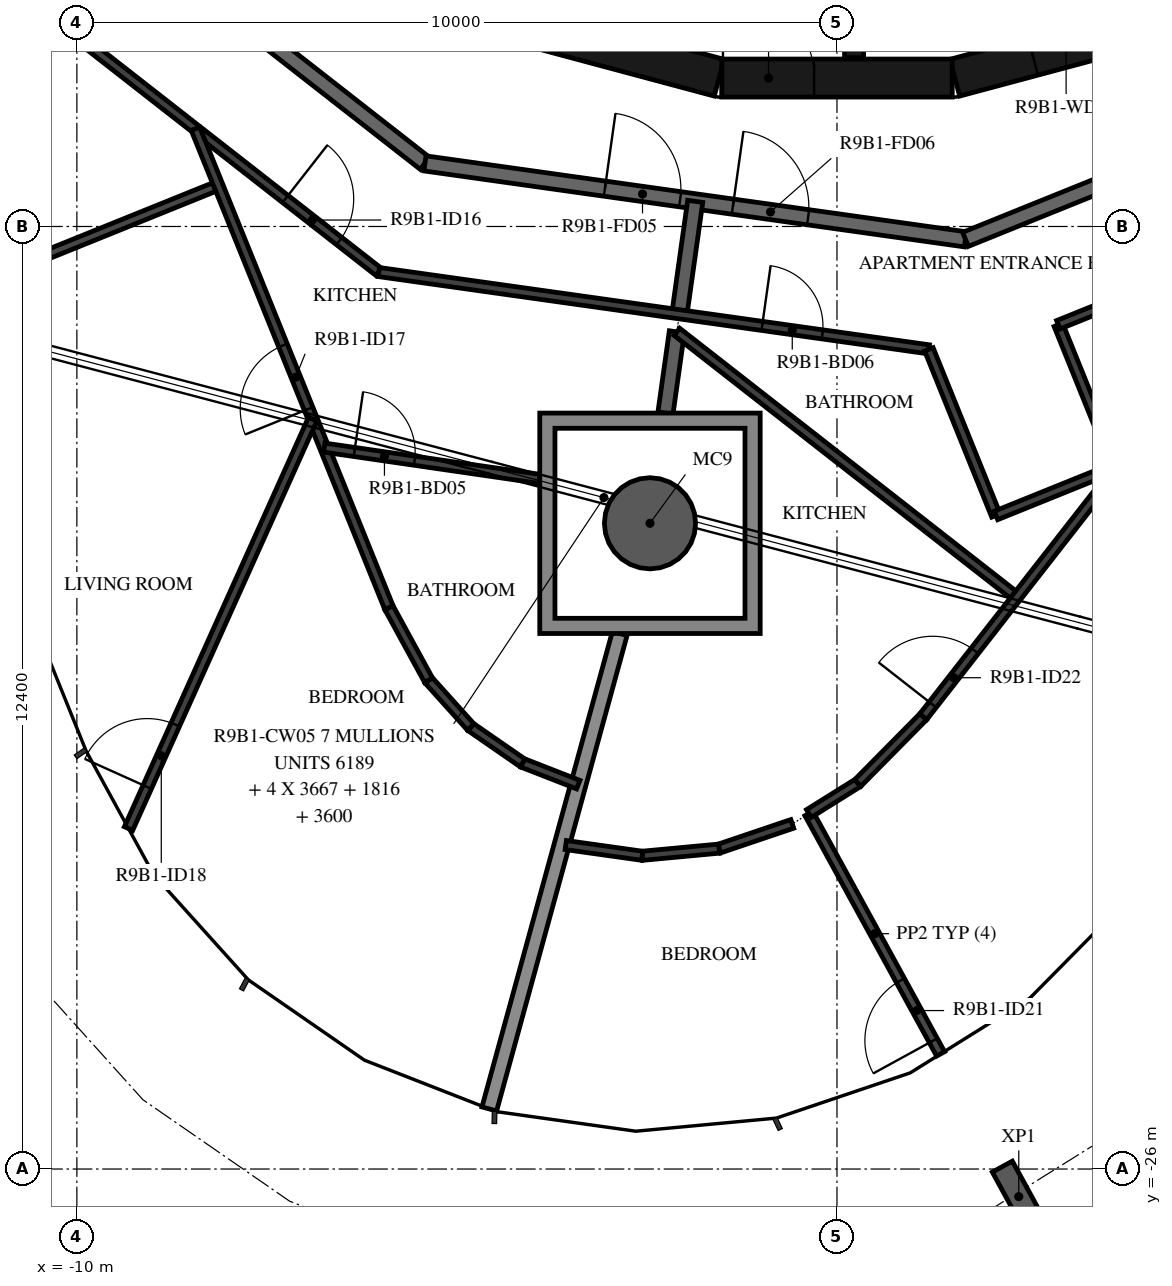
"""IFC4 building model, lengths in metres.
Left out: names, types, materials, properties, quantities, classifications, styles, units other than length and angle.
Written with IfcOpenShell. Run it as: python <this file> out.ifc"""

import sys

from ifc_helpers import new_model, si_unit, direction, frame, frame_2d, origin, origin_2d, place, context, subcontext, project, spatial, polyline, rectangle, hollow_circle, i_section, outline, extrude, element, fill, save


model = new_model("IFC4")
c1 = context("Model", 3, precision=1e-05, world=origin(), true_north=direction((0.0, 1.0)))
c2 = subcontext(c1, "Body", "Model", "MODEL_VIEW")
j1 = project(units=[si_unit("LENGTHUNIT", "METRE"), si_unit("PLANEANGLEUNIT", "RADIAN")], contexts=[c1])
p1 = place(None, origin())
s1 = spatial("IfcSite", under=j1, at=p1, CompositionType="ELEMENT")
p2 = place(p1, origin())
s2 = spatial("IfcBuilding", under=s1, at=p2, CompositionType="ELEMENT")
p3 = place(p2, frame((0.0, 0.0, 350.5)))
s3 = spatial("IfcBuildingStorey", under=s2, at=p3, CompositionType="ELEMENT", Elevation=350.5)
p4 = place(p3, frame((-2.46, -17.505, -0.38), z_axis=(0.0, 0.0, 1.0), x_axis=(1.0, 0.0, 0.0)))
e1 = element("IfcColumn", 1, at=p4, inside=s3, PredefinedType="COLUMN", context=c2, shape_type="SweptSolid", body=[
    extrude(hollow_circle(Radius=0.6, WallThickness=0.03, at=origin_2d()), origin(), (0.0, 0.0, 1.0), 3.5),
])
p5 = place(p3, frame((2.392, -26.363, -0.38), z_axis=(0.0, 0.0, 1.0), x_axis=(-0.877055410309, -0.480389224741, 0.0)))
e2 = element("IfcColumn", 2, at=p5, inside=s3, PredefinedType="COLUMN", context=c2, shape_type="SweptSolid", body=[
    extrude(i_section(OverallWidth=0.3, OverallDepth=0.9, WebThickness=0.019, FlangeThickness=0.035, FilletRadius=0.03, at=origin_2d()), origin(), (0.0, 0.0, 1.0), 3.5),
])
p6 = place(p3, frame((1.55, -11.643, 0.0), z_axis=(0.0, 0.0, 1.0), x_axis=(0.965948410781, 0.258734743916, 0.0)))
e3 = element("IfcWall", 3, at=p6, inside=s3, PredefinedType="SHEAR", context=c2, shape_type="SweptSolid", body=[
    extrude(rectangle(XDim=3.033, YDim=0.5, at=frame_2d((1.516, 0.0))), origin(), (0.0, 0.0, 1.0), 3.12),
])
p7 = place(p6, frame((1.066, 0.0, 0.0)))
e4 = element("IfcOpeningElement", 4, at=p7, cuts=e3, PredefinedType="OPENING", context=c2, shape_type="SweptSolid", body=[
    extrude(rectangle(XDim=0.9, YDim=2.1, at=frame_2d((0.45, 1.05))), frame((0.0, 0.26, 0.0), z_axis=(0.0, -1.0, 0.0), x_axis=(1.0, 0.0, 0.0)), (0.0, 0.0, 1.0), 0.52),
])
p8 = place(p3, frame((-4.479, -10.858, 0.0), z_axis=(0.0, 0.0, 1.0), x_axis=(0.965948410781, -0.258734743916, 0.0)))
e5 = element("IfcWall", 5, at=p8, inside=s3, PredefinedType="SHEAR", context=c2, shape_type="SweptSolid", body=[
    extrude(rectangle(XDim=3.033, YDim=0.5, at=frame_2d((1.516, 0.0))), origin(), (0.0, 0.0, 1.0), 3.12),
])
p9 = place(p3, frame((-1.516, -11.647, 0.0), z_axis=(0.0, 0.0, 1.0), x_axis=(1.0, 0.0, 0.0)))
e6 = element("IfcWall", 6, at=p9, inside=s3, PredefinedType="SHEAR", context=c2, shape_type="SweptSolid", body=[
    extrude(rectangle(XDim=3.033, YDim=0.5, at=frame_2d((1.516, 0.0))), origin(), (0.0, 0.0, 1.0), 3.12),
])
p10 = place(p9, frame((0.016, 0.0, 0.0)))
e7 = element("IfcOpeningElement", 7, at=p10, cuts=e6, PredefinedType="OPENING", context=c2, shape_type="SweptSolid", body=[
    extrude(rectangle(XDim=1.2, YDim=2.1, at=frame_2d((0.6, 1.05))), frame((0.0, 0.26, 0.0), z_axis=(0.0, -1.0, 0.0), x_axis=(1.0, 0.0, 0.0)), (0.0, 0.0, 1.0), 0.52),
])
p11 = place(p3, frame((0.225, -8.97, 0.0), z_axis=(0.0, 0.0, 1.0), x_axis=(0.0, -1.0, 0.0)))
e8 = element("IfcWall", 8, at=p11, inside=s3, PredefinedType="SHEAR", context=c2, shape_type="SweptSolid", body=[
    extrude(rectangle(XDim=2.41, YDim=0.25, at=frame_2d((1.205, 0.0))), origin(), (0.0, 0.0, 1.0), 3.12),
])
p12 = place(p3, frame((-11.079, -8.349, 0.0), z_axis=(0.0, 0.0, 1.0), x_axis=(0.78800478687, -0.615669112324, 0.0)))
e9 = element("IfcWall", 9, at=p12, inside=s3, PredefinedType="STANDARD", context=c2, shape_type="SweptSolid", body=[
    extrude(rectangle(XDim=7.181, YDim=0.2, at=frame_2d((3.591, 0.0))), origin(), (0.0, 0.0, 1.0), 3.12),
])
p13 = place(p3, frame((-5.42, -12.77, 0.0), z_axis=(0.0, 0.0, 1.0), x_axis=(0.990270565508, -0.139155334385, 0.0)))
e10 = element("IfcWall", 10, at=p13, inside=s3, PredefinedType="STANDARD", context=c2, shape_type="SweptSolid", body=[
    extrude(rectangle(XDim=7.181, YDim=0.2, at=frame_2d((3.59, 0.0))), origin(), (0.0, 0.0, 1.0), 3.12),
])
p14 = place(p13, frame((2.39, 0.0, 0.0)))
e11 = element("IfcOpeningElement", 11, at=p14, cuts=e10, PredefinedType="OPENING", context=c2, shape_type="SweptSolid", body=[
    extrude(rectangle(XDim=1.0, YDim=2.1, at=frame_2d((0.5, 1.05))), frame((0.0, 0.11, 0.0), z_axis=(0.0, -1.0, 0.0), x_axis=(1.0, 0.0, 0.0)), (0.0, 0.0, 1.0), 0.22),
])
p15 = place(p13, frame((4.091, 0.0, 0.0)))
e12 = element("IfcOpeningElement", 12, at=p15, cuts=e10, PredefinedType="OPENING", context=c2, shape_type="SweptSolid", body=[
    extrude(rectangle(XDim=1.0, YDim=2.1, at=frame_2d((0.5, 1.05))), frame((0.0, 0.11, 0.0), z_axis=(0.0, -1.0, 0.0), x_axis=(1.0, 0.0, 0.0)), (0.0, 0.0, 1.0), 0.22),
])
p16 = place(p3, frame((1.691, -13.769, 0.0), z_axis=(0.0, 0.0, 1.0), x_axis=(0.92717916932, 0.374618189599, 0.0)))
e13 = element("IfcWall", 13, at=p16, inside=s3, PredefinedType="STANDARD", context=c2, shape_type="SweptSolid", body=[
    extrude(rectangle(XDim=7.181, YDim=0.2, at=frame_2d((3.591, 0.0))), origin(), (0.0, 0.0, 1.0), 3.12),
])
p17 = place(p3, frame((-2.073, -14.755, 0.0), z_axis=(0.0, 0.0, 1.0), x_axis=(0.139005431033, 0.990291618738, 0.0)))
e14 = element("IfcWall", 14, at=p17, inside=s3, PredefinedType="STANDARD", context=c2, shape_type="SweptSolid", body=[
    extrude(rectangle(XDim=1.5, YDim=0.2, at=frame_2d((0.75, 0.0))), origin(), (0.0, 0.0, 1.0), 3.12),
])
p18 = place(p3, frame((-2.256, -16.055, 0.0), z_axis=(0.0, 0.0, 1.0), x_axis=(0.139109268657, 0.990277037689, 0.0)))
e15 = element("IfcWall", 15, at=p18, inside=s3, PredefinedType="STANDARD", context=c2, shape_type="SweptSolid", body=[
    extrude(rectangle(XDim=1.079, YDim=0.2, at=frame_2d((0.54, 0.0))), origin(), (0.0, 0.0, 1.0), 3.12),
])
p19 = place(p3, frame((-4.574, -25.21, 0.0), z_axis=(0.0, 0.0, 1.0), x_axis=(0.264579024648, 0.964364007892, 0.0)))
e16 = element("IfcWall", 16, at=p19, inside=s3, PredefinedType="STANDARD", context=c2, shape_type="SweptSolid", body=[
    extrude(rectangle(XDim=6.486, YDim=0.2, at=frame_2d((3.243, 0.0))), origin(), (0.0, 0.0, 1.0), 2.73),
])
p20 = place(p3, frame((-12.319, -9.283, 0.0), z_axis=(0.0, 0.0, 1.0), x_axis=(0.788000268464, -0.61567489546, 0.0)))
e17 = element("IfcWall", 17, at=p20, inside=s3, PredefinedType="PARTITIONING", context=c2, shape_type="SweptSolid", body=[
    extrude(rectangle(XDim=7.985, YDim=0.12, at=frame_2d((3.992, 0.0))), origin(), (0.0, 0.0, 1.0), 3.12),
])
p21 = place(p20, frame((6.423, 0.0, 0.0)))
e18 = element("IfcOpeningElement", 18, at=p21, cuts=e17, PredefinedType="OPENING", context=c2, shape_type="SweptSolid", body=[
    extrude(rectangle(XDim=0.9, YDim=2.1, at=frame_2d((0.45, 1.05))), frame((0.0, 0.07, 0.0), z_axis=(0.0, -1.0, 0.0), x_axis=(1.0, 0.0, 0.0)), (0.0, 0.0, 1.0), 0.14),
])
p22 = place(p3, frame((-6.027, -14.199, 0.0), z_axis=(0.0, 0.0, 1.0), x_axis=(0.990271617837, -0.139147845494, 0.0)))
e19 = element("IfcWall", 19, at=p22, inside=s3, PredefinedType="PARTITIONING", context=c2, shape_type="SweptSolid", body=[
    extrude(rectangle(XDim=7.308, YDim=0.12, at=frame_2d((3.654, 0.0))), origin(), (0.0, 0.0, 1.0), 3.12),
])
p23 = place(p22, frame((5.093, 0.0, 0.0)))
e20 = element("IfcOpeningElement", 20, at=p23, cuts=e19, PredefinedType="OPENING", context=c2, shape_type="SweptSolid", body=[
    extrude(rectangle(XDim=0.8, YDim=2.1, at=frame_2d((0.4, 1.05))), frame((0.0, 0.07, 0.0), z_axis=(0.0, -1.0, 0.0), x_axis=(1.0, 0.0, 0.0)), (0.0, 0.0, 1.0), 0.14),
])
p24 = place(p3, frame((-12.219, -14.708, 0.0), z_axis=(0.0, 0.0, 1.0), x_axis=(0.927189216671, 0.374593321469, 0.0)))
e21 = element("IfcWall", 21, at=p24, inside=s3, PredefinedType="PARTITIONING", context=c2, shape_type="SweptSolid", body=[
    extrude(rectangle(XDim=4.4, YDim=0.12, at=frame_2d((2.2, 0.0))), origin(), (0.0, 0.0, 1.0), 2.73),
])
p25 = place(p3, frame((-5.894, -18.616, 0.0), z_axis=(0.0, 0.0, 1.0), x_axis=(-0.374596683143, 0.927187858515, 0.0)))
e22 = element("IfcWall", 22, at=p25, inside=s3, PredefinedType="PARTITIONING", context=c2, shape_type="SweptSolid", body=[
    extrude(rectangle(XDim=6.796, YDim=0.12, at=frame_2d((3.398, 0.0))), origin(), (0.0, 0.0, 1.0), 3.12),
])
p26 = place(p25, frame((2.822, 0.0, 0.0)))
e23 = element("IfcOpeningElement", 23, at=p26, cuts=e22, PredefinedType="OPENING", context=c2, shape_type="SweptSolid", body=[
    extrude(rectangle(XDim=0.9, YDim=2.1, at=frame_2d((0.45, 1.05))), frame((0.0, 0.07, 0.0), z_axis=(0.0, -1.0, 0.0), x_axis=(1.0, 0.0, 0.0)), (0.0, 0.0, 1.0), 0.14),
])
p27 = place(p3, frame((-9.32, -21.521, 0.0), z_axis=(0.0, 0.0, 1.0), x_axis=(0.410206582363, 0.911992631432, 0.0)))
e24 = element("IfcWall", 24, at=p27, inside=s3, PredefinedType="PARTITIONING", context=c2, shape_type="SweptSolid", body=[
    extrude(rectangle(XDim=5.908, YDim=0.12, at=frame_2d((2.954, 0.0))), origin(), (0.0, 0.0, 1.0), 3.12),
])
p28 = place(p27, frame((0.6, 0.0, 0.0)))
e25 = element("IfcOpeningElement", 25, at=p28, cuts=e24, PredefinedType="OPENING", context=c2, shape_type="SweptSolid", body=[
    extrude(rectangle(XDim=0.9, YDim=2.1, at=frame_2d((0.45, 1.05))), frame((0.0, 0.07, 0.0), z_axis=(0.0, -1.0, 0.0), x_axis=(1.0, 0.0, 0.0)), (0.0, 0.0, 1.0), 0.14),
])
p29 = place(p3, frame((-6.745, -16.509, 0.0), z_axis=(0.0, 0.0, 1.0), x_axis=(0.989610924185, -0.143771411393, 0.0)))
e26 = element("IfcWall", 26, at=p29, inside=s3, PredefinedType="PARTITIONING", context=c2, shape_type="SweptSolid", body=[
    extrude(rectangle(XDim=2.865, YDim=0.12, at=frame_2d((1.432, 0.0))), origin(), (0.0, 0.0, 1.0), 3.12),
])
p30 = place(p29, frame((0.4, 0.0, 0.0)))
e27 = element("IfcOpeningElement", 27, at=p30, cuts=e26, PredefinedType="OPENING", context=c2, shape_type="SweptSolid", body=[
    extrude(rectangle(XDim=0.8, YDim=2.1, at=frame_2d((0.4, 1.05))), frame((0.0, 0.07, 0.0), z_axis=(0.0, -1.0, 0.0), x_axis=(1.0, 0.0, 0.0)), (0.0, 0.0, 1.0), 0.14),
])
p31 = place(p3, frame((-3.404, -20.943, 0.0), z_axis=(0.0, 0.0, 1.0), x_axis=(-0.931485289212, 0.363778993321, 0.0)))
e28 = element("IfcWall", 28, at=p31, inside=s3, PredefinedType="PARTITIONING", context=c2, shape_type="SweptSolid", body=[
    extrude(rectangle(XDim=0.787, YDim=0.12, at=frame_2d((0.393, 0.0))), origin(), (0.0, 0.0, 1.0), 3.12),
])
p32 = place(p3, frame((-4.136, -20.657, 0.0), z_axis=(0.0, 0.0, 1.0), x_axis=(-0.822552500908, 0.568689179826, 0.0)))
e29 = element("IfcWall", 29, at=p32, inside=s3, PredefinedType="PARTITIONING", context=c2, shape_type="SweptSolid", body=[
    extrude(rectangle(XDim=0.829, YDim=0.12, at=frame_2d((0.415, 0.0))), origin(), (0.0, 0.0, 1.0), 3.12),
])
p33 = place(p3, frame((-4.818, -20.186, 0.0), z_axis=(0.0, 0.0, 1.0), x_axis=(-0.669013557227, 0.743250200301, 0.0)))
e30 = element("IfcWall", 30, at=p33, inside=s3, PredefinedType="PARTITIONING", context=c2, shape_type="SweptSolid", body=[
    extrude(rectangle(XDim=0.829, YDim=0.12, at=frame_2d((0.415, 0.0))), origin(), (0.0, 0.0, 1.0), 3.12),
])
p34 = place(p3, frame((-5.373, -19.57, 0.0), z_axis=(0.0, 0.0, 1.0), x_axis=(-0.479796131471, 0.87738000446, 0.0)))
e31 = element("IfcWall", 31, at=p34, inside=s3, PredefinedType="PARTITIONING", context=c2, shape_type="SweptSolid", body=[
    extrude(rectangle(XDim=1.087, YDim=0.12, at=frame_2d((0.543, 0.0))), origin(), (0.0, 0.0, 1.0), 3.12),
])
p35 = place(p3, frame((1.209, -15.216, 0.0), z_axis=(0.0, 0.0, 1.0), x_axis=(0.374531550488, -0.927214170345, 0.0)))
e32 = element("IfcWall", 32, at=p35, inside=s3, PredefinedType="PARTITIONING", context=c2, shape_type="SweptSolid", body=[
    extrude(rectangle(XDim=2.357, YDim=0.12, at=frame_2d((1.179, 0.0))), origin(), (0.0, 0.0, 1.0), 3.12),
])
p36 = place(p3, frame((2.092, -17.402, 0.0), z_axis=(0.0, 0.0, 1.0), x_axis=(0.927153589835, 0.374681492546, 0.0)))
e33 = element("IfcWall", 33, at=p36, inside=s3, PredefinedType="PARTITIONING", context=c2, shape_type="SweptSolid", body=[
    extrude(rectangle(XDim=1.7, YDim=0.12, at=frame_2d((0.85, 0.0))), origin(), (0.0, 0.0, 1.0), 3.12),
])
p37 = place(p3, frame((3.668, -16.765, 0.0), z_axis=(0.0, 0.0, 1.0), x_axis=(-0.374621045498, 0.927178015416, 0.0)))
e34 = element("IfcWall", 34, at=p37, inside=s3, PredefinedType="PARTITIONING", context=c2, shape_type="SweptSolid", body=[
    extrude(rectangle(XDim=2.018, YDim=0.12, at=frame_2d((1.009, 0.0))), origin(), (0.0, 0.0, 1.0), 3.12),
])
p38 = place(p3, frame((2.912, -14.894, 0.0), z_axis=(0.0, 0.0, 1.0), x_axis=(0.927182280165, 0.374610490174, 0.0)))
e35 = element("IfcWall", 35, at=p38, inside=s3, PredefinedType="PARTITIONING", context=c2, shape_type="SweptSolid", body=[
    extrude(rectangle(XDim=6.872, YDim=0.12, at=frame_2d((3.436, 0.0))), origin(), (0.0, 0.0, 1.0), 3.12),
])
p39 = place(p38, frame((3.748, 0.0, 0.0)))
e36 = element("IfcOpeningElement", 36, at=p39, cuts=e35, PredefinedType="OPENING", context=c2, shape_type="SweptSolid", body=[
    extrude(rectangle(XDim=0.9, YDim=2.1, at=frame_2d((0.45, 1.05))), frame((0.0, 0.07, 0.0), z_axis=(0.0, -1.0, 0.0), x_axis=(1.0, 0.0, 0.0)), (0.0, 0.0, 1.0), 0.14),
])
p40 = place(p3, frame((-0.588, -21.459, 0.0), z_axis=(0.0, 0.0, 1.0), x_axis=(-0.94737753159, -0.320118435332, 0.0)))
e37 = element("IfcWall", 37, at=p40, inside=s3, PredefinedType="PARTITIONING", context=c2, shape_type="SweptSolid", body=[
    extrude(rectangle(XDim=1.016, YDim=0.12, at=frame_2d((0.508, 0.0))), origin(), (0.0, 0.0, 1.0), 3.12),
])
p41 = place(p3, frame((-1.55, -21.785, 0.0), z_axis=(0.0, 0.0, 1.0), x_axis=(-0.995667655176, -0.092983441736, 0.0)))
e38 = element("IfcWall", 38, at=p41, inside=s3, PredefinedType="PARTITIONING", context=c2, shape_type="SweptSolid", body=[
    extrude(rectangle(XDim=1.016, YDim=0.12, at=frame_2d((0.508, 0.0))), origin(), (0.0, 0.0, 1.0), 3.12),
])
p42 = place(p3, frame((-2.562, -21.879, 0.0), z_axis=(0.0, 0.0, 1.0), x_axis=(-0.990273657549, 0.139133328736, 0.0)))
e39 = element("IfcWall", 39, at=p42, inside=s3, PredefinedType="PARTITIONING", context=c2, shape_type="SweptSolid", body=[
    extrude(rectangle(XDim=1.016, YDim=0.12, at=frame_2d((0.508, 0.0))), origin(), (0.0, 0.0, 1.0), 3.12),
])
p43 = place(p3, frame((1.363, -24.485, 0.0), z_axis=(0.0, 0.0, 1.0), x_axis=(-0.480374148719, 0.877063667725, 0.0)))
e40 = element("IfcWall", 40, at=p43, inside=s3, PredefinedType="PARTITIONING", context=c2, shape_type="SweptSolid", body=[
    extrude(rectangle(XDim=3.606, YDim=0.12, at=frame_2d((1.803, 0.0))), origin(), (0.0, 0.0, 1.0), 2.73),
])
p44 = place(p43, frame((0.2, 0.0, 0.0)))
e41 = element("IfcOpeningElement", 41, at=p44, cuts=e40, PredefinedType="OPENING", context=c2, shape_type="SweptSolid", body=[
    extrude(rectangle(XDim=0.9, YDim=2.1, at=frame_2d((0.45, 1.05))), frame((0.0, 0.07, 0.0), z_axis=(0.0, -1.0, 0.0), x_axis=(1.0, 0.0, 0.0)), (0.0, 0.0, 1.0), 0.14),
])
p45 = place(p3, frame((2.363, -18.478, 0.0), z_axis=(0.0, 0.0, 1.0), x_axis=(-0.788010669333, 0.615661583191, 0.0)))
e42 = element("IfcWall", 42, at=p45, inside=s3, PredefinedType="PARTITIONING", context=c2, shape_type="SweptSolid", body=[
    extrude(rectangle(XDim=5.672, YDim=0.12, at=frame_2d((2.836, 0.0))), origin(), (0.0, 0.0, 1.0), 3.12),
])
p46 = place(p3, frame((-0.369, -21.323, 0.0), z_axis=(0.0, 0.0, 1.0), x_axis=(0.847998304005, 0.529998940003, 0.0)))
e43 = element("IfcWall", 43, at=p46, inside=s3, PredefinedType="PARTITIONING", context=c2, shape_type="SweptSolid", body=[
    extrude(rectangle(XDim=0.758, YDim=0.12, at=frame_2d((0.379, 0.0))), origin(), (0.0, 0.0, 1.0), 3.12),
])
p47 = place(p3, frame((0.274, -20.921, 0.0), z_axis=(0.0, 0.0, 1.0), x_axis=(0.702915150142, 0.711273710818, 0.0)))
e44 = element("IfcWall", 44, at=p47, inside=s3, PredefinedType="PARTITIONING", context=c2, shape_type="SweptSolid", body=[
    extrude(rectangle(XDim=1.227, YDim=0.12, at=frame_2d((0.613, 0.0))), origin(), (0.0, 0.0, 1.0), 3.12),
])
p48 = place(p3, frame((1.136, -20.049, 0.0), z_axis=(0.0, 0.0, 1.0), x_axis=(0.615662465763, 0.788009979792, 0.0)))
e45 = element("IfcWall", 45, at=p48, inside=s3, PredefinedType="PARTITIONING", context=c2, shape_type="SweptSolid", body=[
    extrude(rectangle(XDim=8.229, YDim=0.12, at=frame_2d((4.114, 0.0))), origin(), (0.0, 0.0, 1.0), 3.12),
])
p49 = place(p48, frame((0.2, 0.0, 0.0)))
e46 = element("IfcOpeningElement", 46, at=p49, cuts=e45, PredefinedType="OPENING", context=c2, shape_type="SweptSolid", body=[
    extrude(rectangle(XDim=0.9, YDim=2.1, at=frame_2d((0.45, 1.05))), frame((0.0, 0.07, 0.0), z_axis=(0.0, -1.0, 0.0), x_axis=(1.0, 0.0, 0.0)), (0.0, 0.0, 1.0), 0.14),
])
p50 = place(p3, origin())
e47 = element("IfcWall", 47, at=p50, inside=s3, PredefinedType="STANDARD", context=c2, shape_type="SweptSolid", body=[
    extrude(outline(polyline([(-1.01, -16.055), (-1.01, -18.955), (-3.91, -18.955), (-3.91, -16.055), (-1.01, -16.055)]), holes=[polyline([(-3.71, -18.755), (-1.21, -18.755), (-1.21, -16.255), (-3.71, -16.255), (-3.71, -18.755)])]), origin(), (0.0, 0.0, 1.0), 3.12),
])
p51 = place(p10, origin())
e48 = element("IfcDoor", 48, at=p51, inside=s3, OperationType="SINGLE_SWING_RIGHT", PredefinedType="DOOR", context=c2, shape_type="SweptSolid", body=[
    extrude(rectangle(XDim=1.2, YDim=2.1, at=frame_2d((0.6, 1.05))), frame((0.0, 0.025, 0.0), z_axis=(0.0, -1.0, 0.0), x_axis=(1.0, 0.0, 0.0)), (0.0, 0.0, 1.0), 0.05),
])
fill(e7, e48)
p52 = place(p7, origin())
e49 = element("IfcDoor", 49, at=p52, inside=s3, OperationType="SINGLE_SWING_RIGHT", PredefinedType="DOOR", context=c2, shape_type="SweptSolid", body=[
    extrude(rectangle(XDim=0.9, YDim=2.1, at=frame_2d((0.45, 1.05))), frame((0.0, 0.025, 0.0), z_axis=(0.0, -1.0, 0.0), x_axis=(1.0, 0.0, 0.0)), (0.0, 0.0, 1.0), 0.05),
])
fill(e4, e49)
p53 = place(p14, origin())
e50 = element("IfcDoor", 50, at=p53, inside=s3, OperationType="SINGLE_SWING_RIGHT", PredefinedType="DOOR", context=c2, shape_type="SweptSolid", body=[
    extrude(rectangle(XDim=1.0, YDim=2.1, at=frame_2d((0.5, 1.05))), frame((0.0, 0.025, 0.0), z_axis=(0.0, -1.0, 0.0), x_axis=(1.0, 0.0, 0.0)), (0.0, 0.0, 1.0), 0.05),
])
fill(e11, e50)
p54 = place(p21, origin())
e51 = element("IfcDoor", 51, at=p54, inside=s3, OperationType="SINGLE_SWING_RIGHT", PredefinedType="DOOR", context=c2, shape_type="SweptSolid", body=[
    extrude(rectangle(XDim=0.9, YDim=2.1, at=frame_2d((0.45, 1.05))), frame((0.0, 0.025, 0.0), z_axis=(0.0, -1.0, 0.0), x_axis=(1.0, 0.0, 0.0)), (0.0, 0.0, 1.0), 0.05),
])
fill(e18, e51)
p55 = place(p26, origin())
e52 = element("IfcDoor", 52, at=p55, inside=s3, OperationType="SINGLE_SWING_RIGHT", PredefinedType="DOOR", context=c2, shape_type="SweptSolid", body=[
    extrude(rectangle(XDim=0.9, YDim=2.1, at=frame_2d((0.45, 1.05))), frame((0.0, 0.025, 0.0), z_axis=(0.0, -1.0, 0.0), x_axis=(1.0, 0.0, 0.0)), (0.0, 0.0, 1.0), 0.05),
])
fill(e23, e52)
p56 = place(p28, origin())
e53 = element("IfcDoor", 53, at=p56, inside=s3, OperationType="SINGLE_SWING_RIGHT", PredefinedType="DOOR", context=c2, shape_type="SweptSolid", body=[
    extrude(rectangle(XDim=0.9, YDim=2.1, at=frame_2d((0.45, 1.05))), frame((0.0, 0.025, 0.0), z_axis=(0.0, -1.0, 0.0), x_axis=(1.0, 0.0, 0.0)), (0.0, 0.0, 1.0), 0.05),
])
fill(e25, e53)
p57 = place(p30, origin())
e54 = element("IfcDoor", 54, at=p57, inside=s3, OperationType="SINGLE_SWING_RIGHT", PredefinedType="DOOR", context=c2, shape_type="SweptSolid", body=[
    extrude(rectangle(XDim=0.8, YDim=2.1, at=frame_2d((0.4, 1.05))), frame((0.0, 0.025, 0.0), z_axis=(0.0, -1.0, 0.0), x_axis=(1.0, 0.0, 0.0)), (0.0, 0.0, 1.0), 0.05),
])
fill(e27, e54)
p58 = place(p15, origin())
e55 = element("IfcDoor", 55, at=p58, inside=s3, OperationType="SINGLE_SWING_RIGHT", PredefinedType="DOOR", context=c2, shape_type="SweptSolid", body=[
    extrude(rectangle(XDim=1.0, YDim=2.1, at=frame_2d((0.5, 1.05))), frame((0.0, 0.025, 0.0), z_axis=(0.0, -1.0, 0.0), x_axis=(1.0, 0.0, 0.0)), (0.0, 0.0, 1.0), 0.05),
])
fill(e12, e55)
p59 = place(p23, origin())
e56 = element("IfcDoor", 56, at=p59, inside=s3, OperationType="SINGLE_SWING_LEFT", PredefinedType="DOOR", context=c2, shape_type="SweptSolid", body=[
    extrude(rectangle(XDim=0.8, YDim=2.1, at=frame_2d((0.4, 1.05))), frame((0.0, 0.025, 0.0), z_axis=(0.0, -1.0, 0.0), x_axis=(1.0, 0.0, 0.0)), (0.0, 0.0, 1.0), 0.05),
])
fill(e20, e56)
p60 = place(p44, origin())
e57 = element("IfcDoor", 57, at=p60, inside=s3, OperationType="SINGLE_SWING_LEFT", PredefinedType="DOOR", context=c2, shape_type="SweptSolid", body=[
    extrude(rectangle(XDim=0.9, YDim=2.1, at=frame_2d((0.45, 1.05))), frame((0.0, 0.025, 0.0), z_axis=(0.0, -1.0, 0.0), x_axis=(1.0, 0.0, 0.0)), (0.0, 0.0, 1.0), 0.05),
])
fill(e41, e57)
p61 = place(p49, origin())
e58 = element("IfcDoor", 58, at=p61, inside=s3, OperationType="SINGLE_SWING_RIGHT", PredefinedType="DOOR", context=c2, shape_type="SweptSolid", body=[
    extrude(rectangle(XDim=0.9, YDim=2.1, at=frame_2d((0.45, 1.05))), frame((0.0, 0.025, 0.0), z_axis=(0.0, -1.0, 0.0), x_axis=(1.0, 0.0, 0.0)), (0.0, 0.0, 1.0), 0.05),
])
fill(e46, e58)
save(model, sys.argv[1])
